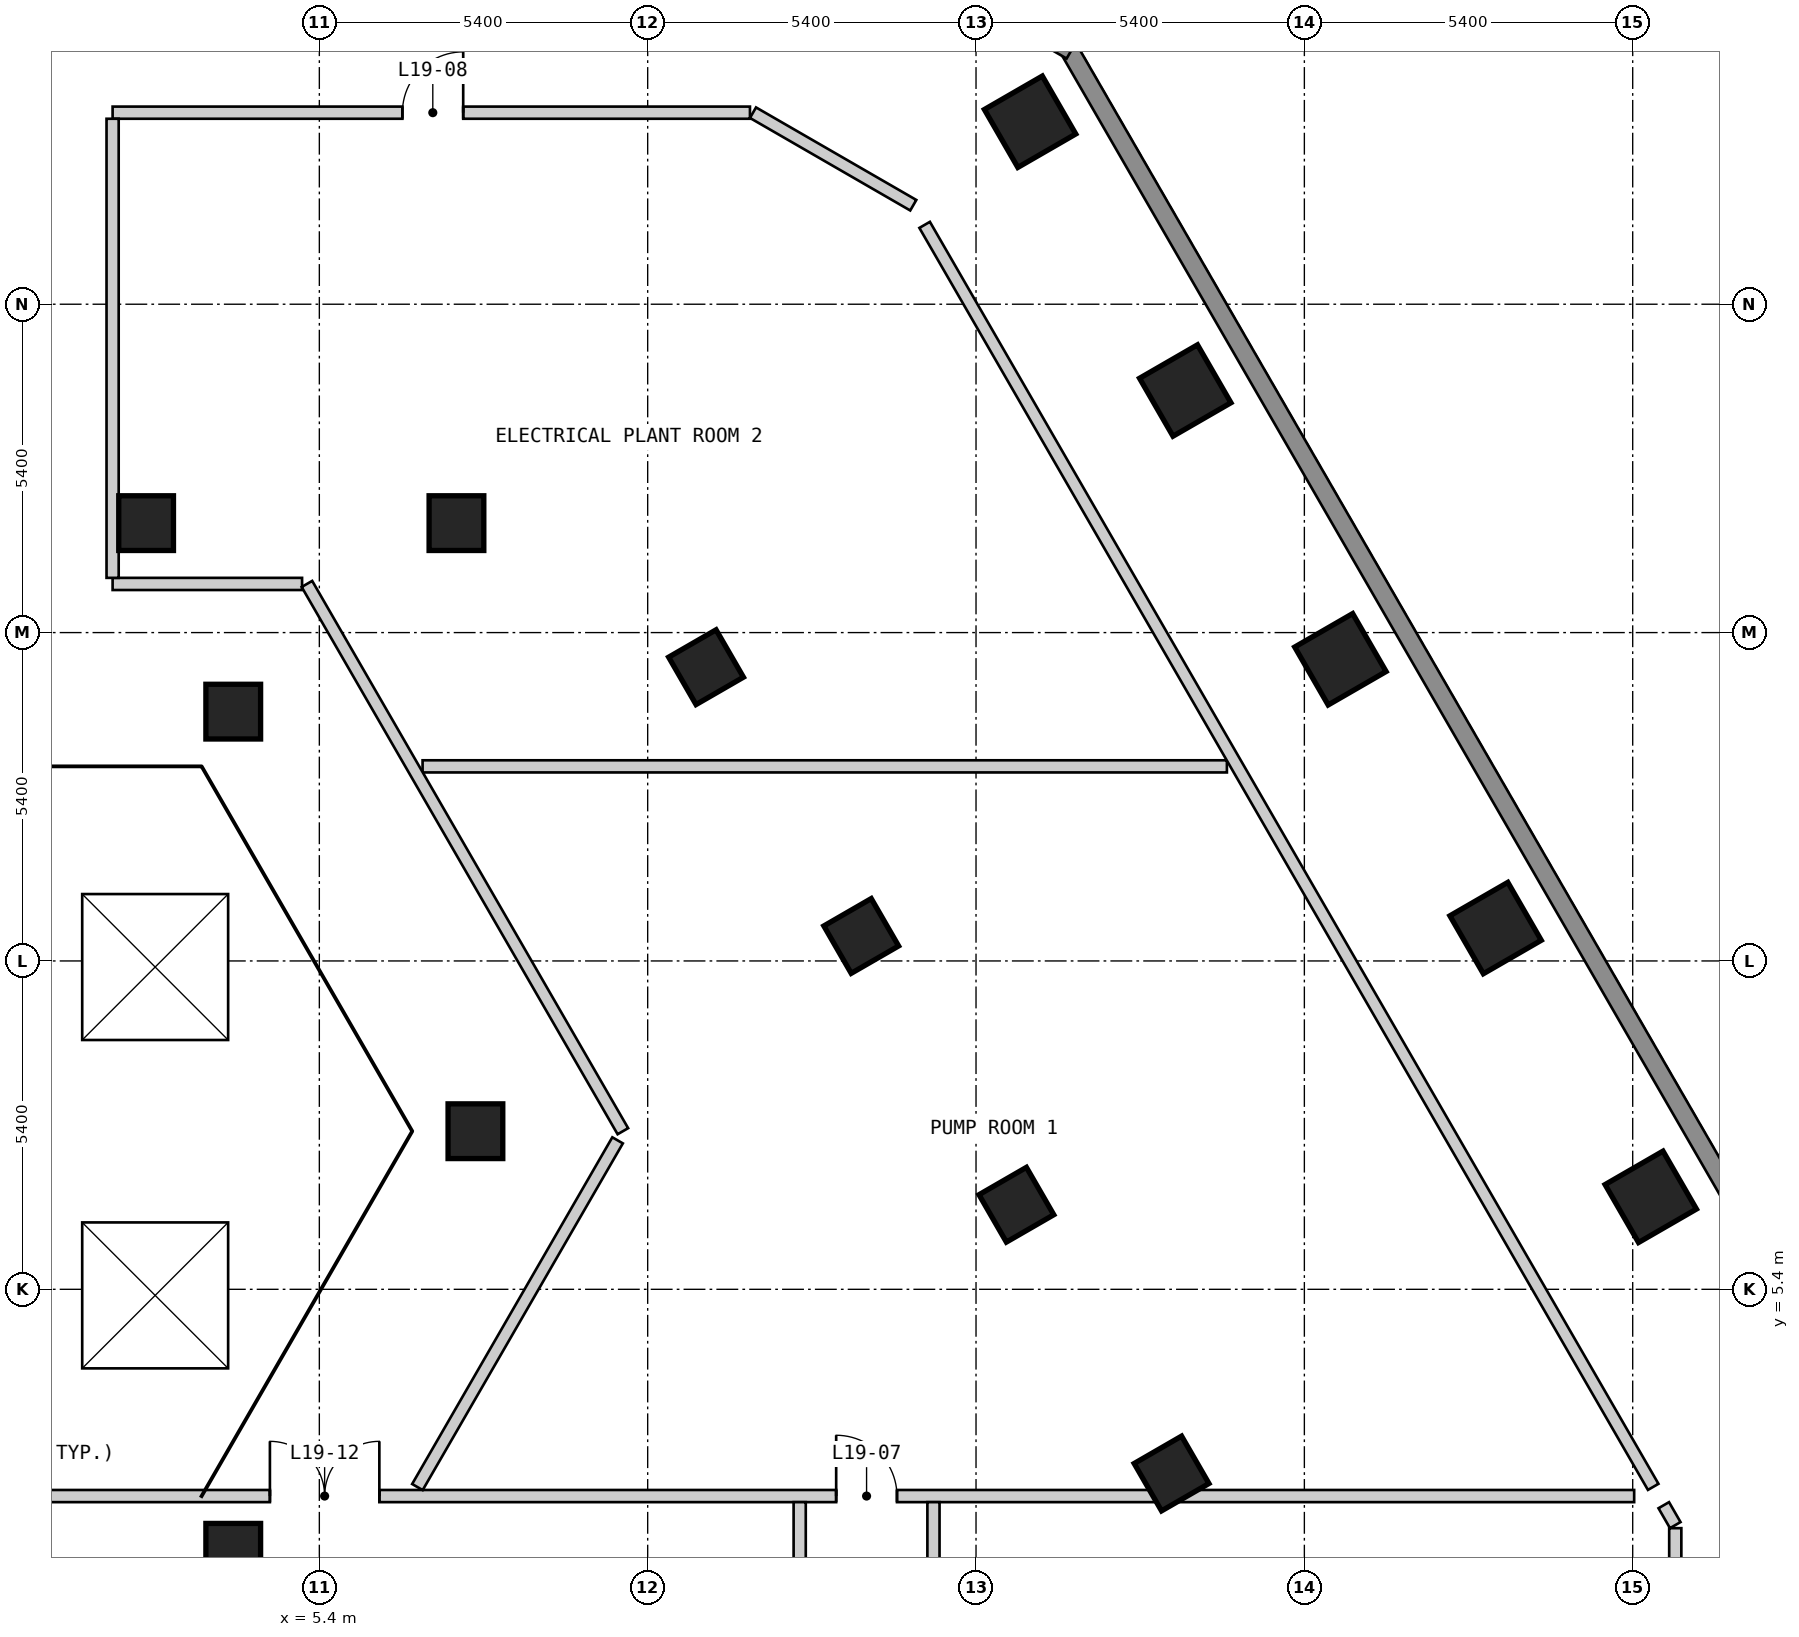
"""IFC4 building model, lengths in metres.
Left out: names, types, materials, properties, quantities, classifications, styles, units other than length and angle.
Written with IfcOpenShell. Run it as: python <this file> out.ifc"""

import sys

from ifc_helpers import new_model, si_unit, direction, frame, frame_2d, origin, origin_2d, place, context, subcontext, project, spatial, polyline, rectangle, outline, extrude, element, fill, save


model = new_model("IFC4")
c1 = context("Model", 3, precision=1e-05, world=origin(), true_north=direction((0.0, 1.0)))
c2 = subcontext(c1, "Body", "Model", "MODEL_VIEW")
j1 = project(units=[si_unit("LENGTHUNIT", "METRE"), si_unit("PLANEANGLEUNIT", "RADIAN")], contexts=[c1])
p1 = place(None, origin())
s1 = spatial("IfcSite", under=j1, at=p1, CompositionType="ELEMENT")
p2 = place(p1, origin())
s2 = spatial("IfcBuilding", under=s1, at=p2, CompositionType="ELEMENT")
p3 = place(p2, frame((0.0, 0.0, 62.4)))
s3 = spatial("IfcBuildingStorey", under=s2, at=p3, CompositionType="ELEMENT", Elevation=62.4)
for number, where, z_axis, x_axis in (
    (1, (27.297, 6.921, 0.0), (0.0, 0.0, 1.0), (-0.5, 0.866, 0.0)),
    (2, (24.745, 11.341, 0.0), (0.0, 0.0, 1.0), (-0.5, 0.866, 0.0)),
    (3, (22.193, 15.761, 0.0), (0.0, 0.0, 1.0), (-0.5, 0.866, 0.0)),
    (4, (19.641, 20.181, 0.0), (0.0, 0.0, 1.0), (-0.5, 0.866, 0.0)),
    (5, (17.089, 24.601, 0.0), (0.0, 0.0, 1.0), (-0.5, 0.866, 0.0)),
):
    element("IfcColumn", number, at=place(p3, frame(where, z_axis=z_axis, x_axis=x_axis)), inside=s3, PredefinedType="COLUMN", context=c2, shape_type="SweptSolid", body=[
        extrude(rectangle(XDim=1.1, YDim=1.1, at=origin_2d()), origin(), (0.0, 0.0, 1.0), 3.6),
    ])
for number, where, z_axis, x_axis in (
    (6, (19.416, 2.371, 0.0), (0.0, 0.0, 1.0), (-0.5, 0.866, 0.0)),
    (7, (3.984, 1.1, 0.0), (0.0, 0.0, 1.0), (1.0, 0.0, 0.0)),
    (8, (16.864, 6.791, 0.0), (0.0, 0.0, 1.0), (-0.5, 0.866, 0.0)),
    (9, (14.312, 11.211, 0.0), (0.0, 0.0, 1.0), (-0.5, 0.866, 0.0)),
    (10, (7.967, 8.0, 0.0), (0.0, 0.0, 1.0), (1.0, 0.0, 0.0)),
    (11, (11.76, 15.631, 0.0), (0.0, 0.0, 1.0), (-0.5, 0.866, 0.0)),
    (12, (7.655, 18.0, 0.0), (0.0, 0.0, 1.0), (-1.0, 0.0, 0.0)),
    (13, (3.984, 14.9, 0.0), (0.0, 0.0, 1.0), (1.0, 0.0, 0.0)),
):
    element("IfcColumn", number, at=place(p3, frame(where, z_axis=z_axis, x_axis=x_axis)), inside=s3, PredefinedType="COLUMN", context=c2, shape_type="SweptSolid", body=[
        extrude(rectangle(XDim=0.9, YDim=0.9, at=origin_2d()), origin(), (0.0, 0.0, 1.0), 3.6),
    ])
p4 = place(p3, frame((2.551, 18.0, 0.0), z_axis=(0.0, 0.0, 1.0), x_axis=(-1.0, 0.0, 0.0)))
e14 = element("IfcColumn", 14, at=p4, inside=s3, PredefinedType="COLUMN", context=c2, shape_type="SweptSolid", body=[
    extrude(rectangle(XDim=0.9, YDim=0.9, at=origin_2d()), origin(), (0.0, 0.0, 1.0), 2.6),
])
p5 = place(p3, frame((31.22, 2.425, 0.0), z_axis=(0.0, 0.0, 1.0), x_axis=(-0.500001938803, 0.866024284413, 0.0)))
e15 = element("IfcWall", 15, at=p5, inside=s3, PredefinedType="SOLIDWALL", context=c2, shape_type="SweptSolid", body=[
    extrude(outline(polyline([(0.0, -0.15), (27.02, -0.15), (26.94, 0.15), (0.08, 0.15), (0.0, -0.15)])), origin(), (0.0, 0.0, 1.0), 2.6),
])
p6 = place(p3, frame((17.765, 25.77, 0.0), z_axis=(0.0, 0.0, 1.0), x_axis=(-0.866010750942, 0.50002537861, 0.0)))
e16 = element("IfcWall", 16, at=p6, inside=s3, PredefinedType="SOLIDWALL", context=c2, shape_type="SweptSolid", body=[
    extrude(outline(polyline([(0.0, -0.15), (5.0, -0.15), (4.919, 0.15), (0.08, 0.15), (0.0, -0.15)])), origin(), (0.0, 0.0, 1.0), 2.6),
])
p7 = place(p3, frame((-26.224, 2.0, 0.0), z_axis=(0.0, 0.0, 1.0), x_axis=(1.0, 0.0, 0.0)))
e17 = element("IfcWall", 17, at=p7, inside=s3, PredefinedType="SOLIDWALL", context=c2, shape_type="SweptSolid", body=[
    extrude(rectangle(XDim=53.248, YDim=0.2, at=frame_2d((26.624, 0.0))), origin(), (0.0, 0.0, 1.0), 2.6),
])
p8 = place(p7, frame((9.188, 0.0, 0.0)))
e18 = element("IfcOpeningElement", 18, at=p8, cuts=e17, PredefinedType="OPENING", context=c2, shape_type="SweptSolid", body=[
    extrude(rectangle(XDim=1.8, YDim=2.1, at=frame_2d((0.9, 1.05))), frame((0.0, 0.11, 0.0), z_axis=(0.0, -1.0, 0.0), x_axis=(1.0, 0.0, 0.0)), (0.0, 0.0, 1.0), 0.22),
])
p9 = place(p7, frame((40.124, 0.0, 0.0)))
e19 = element("IfcOpeningElement", 19, at=p9, cuts=e17, PredefinedType="OPENING", context=c2, shape_type="SweptSolid", body=[
    extrude(rectangle(XDim=1.0, YDim=2.1, at=frame_2d((0.5, 1.05))), frame((0.0, 0.11, 0.0), z_axis=(0.0, -1.0, 0.0), x_axis=(1.0, 0.0, 0.0)), (0.0, 0.0, 1.0), 0.22),
])
p10 = place(p7, frame((30.811, 0.0, 0.0)))
e20 = element("IfcOpeningElement", 20, at=p10, cuts=e17, PredefinedType="OPENING", context=c2, shape_type="SweptSolid", body=[
    extrude(rectangle(XDim=1.8, YDim=2.1, at=frame_2d((0.9, 1.05))), frame((0.0, 0.11, 0.0), z_axis=(0.0, -1.0, 0.0), x_axis=(1.0, 0.0, 0.0)), (0.0, 0.0, 1.0), 0.22),
])
p11 = place(p3, frame((7.098, 14.0, 0.0), z_axis=(0.0, 0.0, 1.0), x_axis=(1.0, 0.0, 0.0)))
e21 = element("IfcWall", 21, at=p11, inside=s3, PredefinedType="SOLIDWALL", context=c2, shape_type="SweptSolid", body=[
    extrude(rectangle(XDim=13.228, YDim=0.2, at=frame_2d((6.614, 0.0))), origin(), (0.0, 0.0, 1.0), 2.6),
])
p12 = place(p3, frame((2.0, 17.0, 0.0), z_axis=(0.0, 0.0, 1.0), x_axis=(1.0, 0.0, 0.0)))
e22 = element("IfcWall", 22, at=p12, inside=s3, PredefinedType="SOLIDWALL", context=c2, shape_type="SweptSolid", body=[
    extrude(rectangle(XDim=3.116, YDim=0.2, at=frame_2d((1.558, 0.0))), origin(), (0.0, 0.0, 1.0), 2.6),
])
p13 = place(p3, frame((2.0, 24.75, 0.0), z_axis=(0.0, 0.0, 1.0), x_axis=(1.0, 0.0, 0.0)))
e23 = element("IfcWall", 23, at=p13, inside=s3, PredefinedType="SOLIDWALL", context=c2, shape_type="SweptSolid", body=[
    extrude(rectangle(XDim=10.482, YDim=0.2, at=frame_2d((5.241, 0.0))), origin(), (0.0, 0.0, 1.0), 2.6),
])
p14 = place(p13, frame((5.766, 0.0, 0.0), z_axis=(0.0, 0.0, 1.0), x_axis=(-1.0, 0.0, 0.0)))
e24 = element("IfcOpeningElement", 24, at=p14, cuts=e23, PredefinedType="OPENING", context=c2, shape_type="SweptSolid", body=[
    extrude(rectangle(XDim=1.0, YDim=2.1, at=frame_2d((0.5, 1.05))), frame((0.0, 0.11, 0.0), z_axis=(0.0, -1.0, 0.0), x_axis=(1.0, 0.0, 0.0)), (0.0, 0.0, 1.0), 0.22),
])
p15 = place(p3, frame((2.0, 17.1, 0.0), z_axis=(0.0, 0.0, 1.0), x_axis=(0.0, 1.0, 0.0)))
e25 = element("IfcWall", 25, at=p15, inside=s3, PredefinedType="SOLIDWALL", context=c2, shape_type="SweptSolid", body=[
    extrude(rectangle(XDim=7.55, YDim=0.2, at=frame_2d((3.775, 0.0))), origin(), (0.0, 0.0, 1.0), 2.6),
])
p16 = place(p3, frame((13.3, -4.88, 0.0), z_axis=(0.0, 0.0, 1.0), x_axis=(0.0, 1.0, 0.0)))
e26 = element("IfcWall", 26, at=p16, inside=s3, PredefinedType="PARTITIONING", context=c2, shape_type="SweptSolid", body=[
    extrude(rectangle(XDim=6.78, YDim=0.2, at=frame_2d((3.39, 0.0))), origin(), (0.0, 0.0, 1.0), 2.6),
])
p17 = place(p3, frame((15.5, -10.494, 0.0), z_axis=(0.0, 0.0, 1.0), x_axis=(0.0, 1.0, 0.0)))
e27 = element("IfcWall", 27, at=p17, inside=s3, PredefinedType="SOLIDWALL", context=c2, shape_type="SweptSolid", body=[
    extrude(rectangle(XDim=12.394, YDim=0.2, at=frame_2d((6.197, 0.0))), origin(), (0.0, 0.0, 1.0), 2.6),
])
p18 = place(p17, frame((7.492, 0.0, 0.0), z_axis=(0.0, 0.0, 1.0), x_axis=(-1.0, 0.0, 0.0)))
e28 = element("IfcOpeningElement", 28, at=p18, cuts=e27, PredefinedType="OPENING", context=c2, shape_type="SweptSolid", body=[
    extrude(rectangle(XDim=1.0, YDim=2.1, at=frame_2d((0.5, 1.05))), frame((0.0, 0.11, 0.0), z_axis=(0.0, -1.0, 0.0), x_axis=(1.0, 0.0, 0.0)), (0.0, 0.0, 1.0), 0.22),
])
p19 = place(p3, frame((27.7, -1.522, 0.0), z_axis=(0.0, 0.0, 1.0), x_axis=(0.0, 1.0, 0.0)))
e29 = element("IfcWall", 29, at=p19, inside=s3, PredefinedType="SOLIDWALL", context=c2, shape_type="SweptSolid", body=[
    extrude(rectangle(XDim=2.994, YDim=0.2, at=frame_2d((1.497, 0.0))), origin(), (0.0, 0.0, 1.0), 2.6),
])
p20 = place(p3, frame((12.532, 24.75, 0.0), z_axis=(0.0, 0.0, 1.0), x_axis=(0.866013277291, -0.500021003115, 0.0)))
e30 = element("IfcWall", 30, at=p20, inside=s3, PredefinedType="SOLIDWALL", context=c2, shape_type="SweptSolid", body=[
    extrude(rectangle(XDim=3.044, YDim=0.2, at=frame_2d((1.522, 0.0))), origin(), (0.0, 0.0, 1.0), 2.6),
])
p21 = place(p3, frame((5.196, 17.0, 0.0), z_axis=(0.0, 0.0, 1.0), x_axis=(0.499992241736, -0.866029882974, 0.0)))
e31 = element("IfcWall", 31, at=p21, inside=s3, PredefinedType="SOLIDWALL", context=c2, shape_type="SweptSolid", body=[
    extrude(rectangle(XDim=10.392, YDim=0.2, at=frame_2d((5.196, 0.0))), origin(), (0.0, 0.0, 1.0), 2.6),
])
p22 = place(p3, frame((15.355, 22.905, 0.0), z_axis=(0.0, 0.0, 1.0), x_axis=(0.499984955192, -0.866034089734, 0.0)))
e32 = element("IfcWall", 32, at=p22, inside=s3, PredefinedType="SOLIDWALL", context=c2, shape_type="SweptSolid", body=[
    extrude(rectangle(XDim=23.965, YDim=0.2, at=frame_2d((11.982, 0.0))), origin(), (0.0, 0.0, 1.0), 2.6),
])
p23 = place(p3, frame((27.511, 1.85, 0.0), z_axis=(0.0, 0.0, 1.0), x_axis=(0.499052486836, -0.866571760088, 0.0)))
e33 = element("IfcWall", 33, at=p23, inside=s3, PredefinedType="SOLIDWALL", context=c2, shape_type="SweptSolid", body=[
    extrude(rectangle(XDim=0.379, YDim=0.2, at=frame_2d((0.189, 0.0))), origin(), (0.0, 0.0, 1.0), 2.6),
])
p24 = place(p3, frame((7.013, 2.148, 0.0), z_axis=(0.0, 0.0, 1.0), x_axis=(0.499983511822, 0.866034923029, 0.0)))
e34 = element("IfcWall", 34, at=p24, inside=s3, PredefinedType="SOLIDWALL", context=c2, shape_type="SweptSolid", body=[
    extrude(rectangle(XDim=6.584, YDim=0.2, at=frame_2d((3.292, 0.0))), origin(), (0.0, 0.0, 1.0), 2.6),
])
p25 = place(p3, frame((0.0, 0.0, -0.4)))
p26 = place(p25, frame((2.7, 5.3, 0.0)))
p27 = place(p26, frame((0.0, 0.0, 0.35)))
e35 = element("IfcWindow", 35, at=p27, inside=s3, PartitioningType="SINGLE_PANEL", PredefinedType="SKYLIGHT", context=c2, shape_type="SweptSolid", body=[
    extrude(rectangle(XDim=2.4, YDim=2.4, at=origin_2d()), origin(), (0.0, 0.0, 1.0), 0.05),
])
p28 = place(p25, frame((2.7, 10.7, 0.0)))
p29 = place(p28, frame((0.0, 0.0, 0.35)))
e36 = element("IfcWindow", 36, at=p29, inside=s3, PartitioningType="SINGLE_PANEL", PredefinedType="SKYLIGHT", context=c2, shape_type="SweptSolid", body=[
    extrude(rectangle(XDim=2.4, YDim=2.4, at=origin_2d()), origin(), (0.0, 0.0, 1.0), 0.05),
])
p30 = place(p9, origin())
e37 = element("IfcDoor", 37, at=p30, inside=s3, OperationType="SINGLE_SWING_LEFT", PredefinedType="DOOR", context=c2, shape_type="SweptSolid", body=[
    extrude(rectangle(XDim=1.0, YDim=2.1, at=frame_2d((0.5, 1.05))), frame((0.0, 0.025, 0.0), z_axis=(0.0, -1.0, 0.0), x_axis=(1.0, 0.0, 0.0)), (0.0, 0.0, 1.0), 0.05),
])
fill(e19, e37)
p31 = place(p14, origin())
e38 = element("IfcDoor", 38, at=p31, inside=s3, OperationType="SINGLE_SWING_LEFT", PredefinedType="DOOR", context=c2, shape_type="SweptSolid", body=[
    extrude(rectangle(XDim=1.0, YDim=2.1, at=frame_2d((0.5, 1.05))), frame((0.0, 0.025, 0.0), z_axis=(0.0, -1.0, 0.0), x_axis=(1.0, 0.0, 0.0)), (0.0, 0.0, 1.0), 0.05),
])
fill(e24, e38)
p32 = place(p10, origin())
e39 = element("IfcDoor", 39, at=p32, inside=s3, OperationType="DOUBLE_DOOR_SINGLE_SWING", PredefinedType="DOOR", context=c2, shape_type="SweptSolid", body=[
    extrude(rectangle(XDim=1.8, YDim=2.1, at=frame_2d((0.9, 1.05))), frame((0.0, 0.025, 0.0), z_axis=(0.0, -1.0, 0.0), x_axis=(1.0, 0.0, 0.0)), (0.0, 0.0, 1.0), 0.05),
])
fill(e20, e39)
save(model, sys.argv[1])
